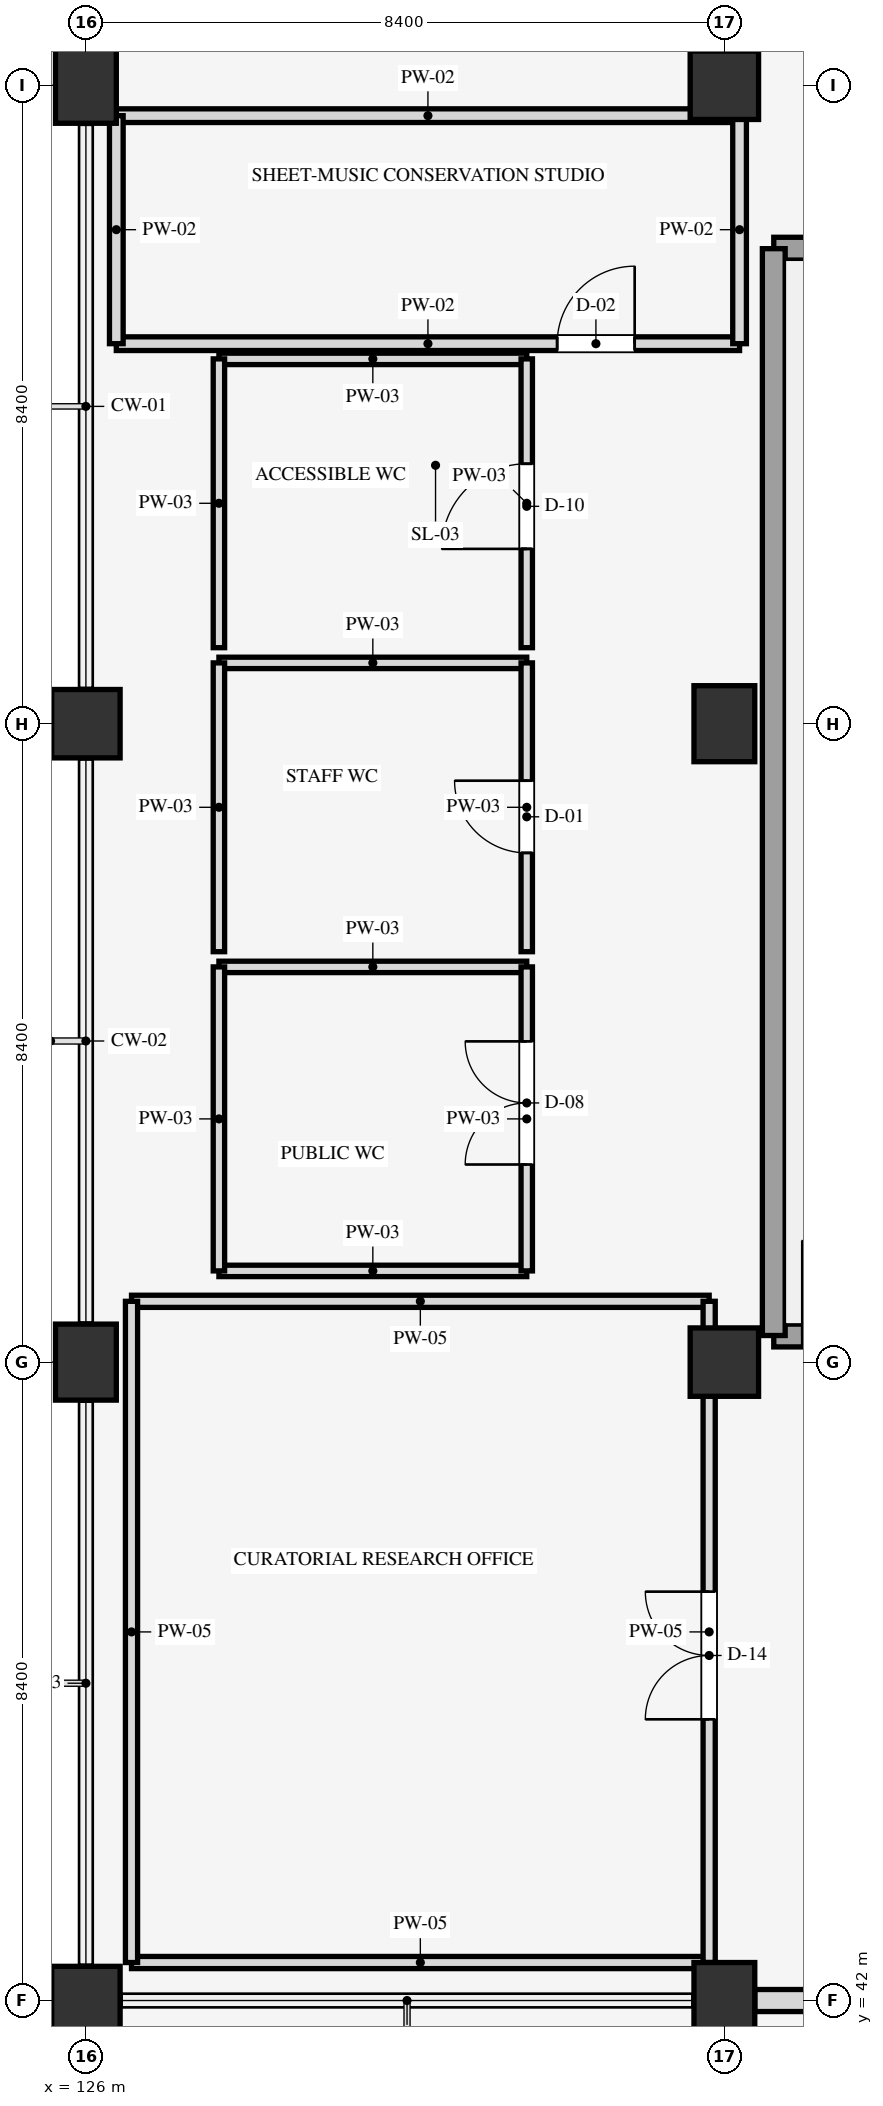
"""IFC4 building model, lengths in metres.
Left out: names, types, materials, properties, quantities, classifications, styles, units other than length and angle.
Written with IfcOpenShell. Run it as: python <this file> out.ifc"""

import sys

from ifc_helpers import new_model, si_unit, direction, frame, frame_2d, origin, origin_2d, place, context, subcontext, project, spatial, rectangle, extrude, element, fill, save


model = new_model("IFC4")
c1 = context("Model", 3, precision=1e-05, world=origin(), true_north=direction((0.0, 1.0)))
c2 = subcontext(c1, "Body", "Model", "MODEL_VIEW")
j1 = project(units=[si_unit("LENGTHUNIT", "METRE"), si_unit("PLANEANGLEUNIT", "RADIAN")], contexts=[c1])
p1 = place(None, origin())
s1 = spatial("IfcSite", under=j1, at=p1, CompositionType="ELEMENT")
p2 = place(p1, origin())
s2 = spatial("IfcBuilding", under=s1, at=p2, CompositionType="ELEMENT")
p3 = place(p2, frame((0.0, 0.0, 57.3)))
s3 = spatial("IfcBuildingStorey", under=s2, at=p3, CompositionType="ELEMENT", Elevation=57.3)
p4 = place(p3, frame((126.0, 42.0, 0.0), z_axis=(0.0, 0.0, 1.0), x_axis=(1.0, 0.0, 0.0)))
e1 = element("IfcColumn", 1, at=p4, inside=s3, PredefinedType="COLUMN", context=c2, shape_type="SweptSolid", body=[
    extrude(rectangle(XDim=0.9, YDim=0.9, at=origin_2d()), origin(), (0.0, 0.0, 1.0), 4.2),
])
p5 = place(p3, frame((126.0, 50.4, 0.0), z_axis=(0.0, 0.0, 1.0), x_axis=(1.0, 0.0, 0.0)))
e2 = element("IfcColumn", 2, at=p5, inside=s3, PredefinedType="COLUMN", context=c2, shape_type="SweptSolid", body=[
    extrude(rectangle(XDim=0.8, YDim=1.0, at=origin_2d()), origin(), (0.0, 0.0, 1.0), 4.2),
])
p6 = place(p3, frame((126.0, 58.8, 0.0), z_axis=(0.0, 0.0, 1.0), x_axis=(1.0, 0.0, 0.0)))
e3 = element("IfcColumn", 3, at=p6, inside=s3, PredefinedType="COLUMN", context=c2, shape_type="SweptSolid", body=[
    extrude(rectangle(XDim=0.9, YDim=0.9, at=origin_2d()), origin(), (0.0, 0.0, 1.0), 4.2),
])
for number, where, z_axis, x_axis in (
    (4, (126.0, 67.2, 0.0), (0.0, 0.0, 1.0), (1.0, 0.0, 0.0)),
    (5, (134.4, 42.0, 0.0), (0.0, 0.0, 1.0), (1.0, 0.0, 0.0)),
):
    element("IfcColumn", number, at=place(p3, frame(where, z_axis=z_axis, x_axis=x_axis)), inside=s3, PredefinedType="COLUMN", context=c2, shape_type="SweptSolid", body=[
        extrude(rectangle(XDim=0.8, YDim=1.0, at=origin_2d()), origin(), (0.0, 0.0, 1.0), 4.2),
    ])
p7 = place(p3, frame((134.4, 50.4, 0.0), z_axis=(0.0, 0.0, 1.0), x_axis=(1.0, 0.0, 0.0)))
e6 = element("IfcColumn", 6, at=p7, inside=s3, PredefinedType="COLUMN", context=c2, shape_type="SweptSolid", body=[
    extrude(rectangle(XDim=0.9, YDim=0.9, at=origin_2d()), origin(), (0.0, 0.0, 1.0), 4.2),
])
p8 = place(p3, frame((134.4, 58.8, 0.0), z_axis=(0.0, 0.0, 1.0), x_axis=(1.0, 0.0, 0.0)))
e7 = element("IfcColumn", 7, at=p8, inside=s3, PredefinedType="COLUMN", context=c2, shape_type="SweptSolid", body=[
    extrude(rectangle(XDim=0.8, YDim=1.0, at=origin_2d()), origin(), (0.0, 0.0, 1.0), 4.2),
])
p9 = place(p3, frame((134.4, 67.2, 0.0), z_axis=(0.0, 0.0, 1.0), x_axis=(1.0, 0.0, 0.0)))
e8 = element("IfcColumn", 8, at=p9, inside=s3, PredefinedType="COLUMN", context=c2, shape_type="SweptSolid", body=[
    extrude(rectangle(XDim=0.9, YDim=0.9, at=origin_2d()), origin(), (0.0, 0.0, 1.0), 4.2),
])
p10 = place(p3, frame((134.8, 42.0, 0.0), z_axis=(0.0, 0.0, 1.0), x_axis=(1.0, 0.0, 0.0)))
e9 = element("IfcWall", 9, at=p10, inside=s3, PredefinedType="STANDARD", context=c2, shape_type="SweptSolid", body=[
    extrude(rectangle(XDim=7.55, YDim=0.29, at=frame_2d((3.775, 0.0))), origin(), (0.0, 0.0, 1.0), 3.38),
])
p11 = place(p10, frame((2.95, 0.0, 0.0)))
e10 = element("IfcOpeningElement", 10, at=p11, cuts=e9, PredefinedType="OPENING", context=c2, shape_type="SweptSolid", body=[
    extrude(rectangle(XDim=1.65, YDim=2.2, at=frame_2d((0.825, 1.1))), frame((0.0, 0.155, 0.0), z_axis=(0.0, -1.0, 0.0), x_axis=(1.0, 0.0, 0.0)), (0.0, 0.0, 1.0), 0.31),
])
p12 = place(p3, frame((135.05, 50.75, 0.0), z_axis=(0.0, 0.0, 1.0), x_axis=(1.0, 0.0, 0.0)))
e11 = element("IfcWall", 11, at=p12, inside=s3, PredefinedType="SHEAR", context=c2, shape_type="SweptSolid", body=[
    extrude(rectangle(XDim=4.0, YDim=0.3, at=frame_2d((2.0, 0.0))), origin(), (0.0, 0.0, 1.0), 4.2),
])
p13 = place(p12, frame((0.375, 0.0, 0.0)))
e12 = element("IfcOpeningElement", 12, at=p13, cuts=e11, PredefinedType="OPENING", context=c2, shape_type="SweptSolid", body=[
    extrude(rectangle(XDim=1.25, YDim=2.15, at=frame_2d((0.625, 1.075))), frame((0.0, 0.16, 0.0), z_axis=(0.0, -1.0, 0.0), x_axis=(1.0, 0.0, 0.0)), (0.0, 0.0, 1.0), 0.32),
])
p14 = place(p3, frame((135.05, 65.05, 0.0), z_axis=(0.0, 0.0, 1.0), x_axis=(1.0, 0.0, 0.0)))
e13 = element("IfcWall", 13, at=p14, inside=s3, PredefinedType="SHEAR", context=c2, shape_type="SweptSolid", body=[
    extrude(rectangle(XDim=4.0, YDim=0.3, at=frame_2d((2.0, 0.0))), origin(), (0.0, 0.0, 1.0), 4.2),
])
p15 = place(p3, frame((135.05, 50.75, 0.0), z_axis=(0.0, 0.0, 1.0), x_axis=(0.0, 1.0, 0.0)))
e14 = element("IfcWall", 14, at=p15, inside=s3, PredefinedType="SHEAR", context=c2, shape_type="SweptSolid", body=[
    extrude(rectangle(XDim=14.3, YDim=0.3, at=frame_2d((7.15, 0.0))), origin(), (0.0, 0.0, 1.0), 4.2),
])
for number, where, z_axis, x_axis in (
    (15, (127.75, 51.6, 0.0), (0.0, 0.0, 1.0), (1.0, 0.0, 0.0)),
    (16, (127.75, 55.6, 0.0), (0.0, 0.0, 1.0), (1.0, 0.0, 0.0)),
):
    element("IfcWall", number, at=place(p3, frame(where, z_axis=z_axis, x_axis=x_axis)), inside=s3, PredefinedType="PARTITIONING", context=c2, shape_type="SweptSolid", body=[
        extrude(rectangle(XDim=4.05, YDim=0.15, at=frame_2d((2.025, 0.0))), origin(), (0.0, 0.0, 1.0), 3.24),
    ])
p16 = place(p3, frame((127.75, 51.6, 0.0), z_axis=(0.0, 0.0, 1.0), x_axis=(0.0, 1.0, 0.0)))
e17 = element("IfcWall", 17, at=p16, inside=s3, PredefinedType="PARTITIONING", context=c2, shape_type="SweptSolid", body=[
    extrude(rectangle(XDim=4.0, YDim=0.15, at=frame_2d((2.0, 0.0))), origin(), (0.0, 0.0, 1.0), 3.24),
])
p17 = place(p3, frame((131.8, 51.6, 0.0), z_axis=(0.0, 0.0, 1.0), x_axis=(0.0, 1.0, 0.0)))
e18 = element("IfcWall", 18, at=p17, inside=s3, PredefinedType="PARTITIONING", context=c2, shape_type="SweptSolid", body=[
    extrude(rectangle(XDim=4.0, YDim=0.15, at=frame_2d((2.0, 0.0))), origin(), (0.0, 0.0, 1.0), 3.24),
])
p18 = place(p17, frame((1.4, 0.0, 0.0)))
e19 = element("IfcOpeningElement", 19, at=p18, cuts=e18, PredefinedType="OPENING", context=c2, shape_type="SweptSolid", body=[
    extrude(rectangle(XDim=1.62, YDim=2.22, at=frame_2d((0.81, 1.11))), frame((0.0, 0.085, 0.0), z_axis=(0.0, -1.0, 0.0), x_axis=(1.0, 0.0, 0.0)), (0.0, 0.0, 1.0), 0.17),
])
p19 = place(p3, frame((127.75, 59.6, 0.0), z_axis=(0.0, 0.0, 1.0), x_axis=(1.0, 0.0, 0.0)))
e20 = element("IfcWall", 20, at=p19, inside=s3, PredefinedType="PARTITIONING", context=c2, shape_type="SweptSolid", body=[
    extrude(rectangle(XDim=4.05, YDim=0.15, at=frame_2d((2.025, 0.0))), origin(), (0.0, 0.0, 1.0), 3.24),
])
p20 = place(p3, frame((127.75, 55.8, 0.0), z_axis=(0.0, 0.0, 1.0), x_axis=(0.0, 1.0, 0.0)))
e21 = element("IfcWall", 21, at=p20, inside=s3, PredefinedType="PARTITIONING", context=c2, shape_type="SweptSolid", body=[
    extrude(rectangle(XDim=3.8, YDim=0.15, at=frame_2d((1.9, 0.0))), origin(), (0.0, 0.0, 1.0), 3.24),
])
p21 = place(p3, frame((131.8, 55.8, 0.0), z_axis=(0.0, 0.0, 1.0), x_axis=(0.0, 1.0, 0.0)))
e22 = element("IfcWall", 22, at=p21, inside=s3, PredefinedType="PARTITIONING", context=c2, shape_type="SweptSolid", body=[
    extrude(rectangle(XDim=3.8, YDim=0.15, at=frame_2d((1.9, 0.0))), origin(), (0.0, 0.0, 1.0), 3.24),
])
p22 = place(p21, frame((1.3, 0.0, 0.0)))
e23 = element("IfcOpeningElement", 23, at=p22, cuts=e22, PredefinedType="OPENING", context=c2, shape_type="SweptSolid", body=[
    extrude(rectangle(XDim=0.95, YDim=2.1, at=frame_2d((0.475, 1.05))), frame((0.0, 0.085, 0.0), z_axis=(0.0, -1.0, 0.0), x_axis=(1.0, 0.0, 0.0)), (0.0, 0.0, 1.0), 0.17),
])
p23 = place(p3, frame((127.75, 63.6, 0.0), z_axis=(0.0, 0.0, 1.0), x_axis=(1.0, 0.0, 0.0)))
e24 = element("IfcWall", 24, at=p23, inside=s3, PredefinedType="PARTITIONING", context=c2, shape_type="SweptSolid", body=[
    extrude(rectangle(XDim=4.05, YDim=0.15, at=frame_2d((2.025, 0.0))), origin(), (0.0, 0.0, 1.0), 3.24),
])
p24 = place(p3, frame((127.75, 59.8, 0.0), z_axis=(0.0, 0.0, 1.0), x_axis=(0.0, 1.0, 0.0)))
e25 = element("IfcWall", 25, at=p24, inside=s3, PredefinedType="PARTITIONING", context=c2, shape_type="SweptSolid", body=[
    extrude(rectangle(XDim=3.8, YDim=0.15, at=frame_2d((1.9, 0.0))), origin(), (0.0, 0.0, 1.0), 3.24),
])
p25 = place(p3, frame((131.8, 59.8, 0.0), z_axis=(0.0, 0.0, 1.0), x_axis=(0.0, 1.0, 0.0)))
e26 = element("IfcWall", 26, at=p25, inside=s3, PredefinedType="PARTITIONING", context=c2, shape_type="SweptSolid", body=[
    extrude(rectangle(XDim=3.8, YDim=0.15, at=frame_2d((1.9, 0.0))), origin(), (0.0, 0.0, 1.0), 3.24),
])
p26 = place(p25, frame((1.3, 0.0, 0.0)))
e27 = element("IfcOpeningElement", 27, at=p26, cuts=e26, PredefinedType="OPENING", context=c2, shape_type="SweptSolid", body=[
    extrude(rectangle(XDim=1.12, YDim=2.14, at=frame_2d((0.56, 1.07))), frame((0.0, 0.085, 0.0), z_axis=(0.0, -1.0, 0.0), x_axis=(1.0, 0.0, 0.0)), (0.0, 0.0, 1.0), 0.17),
])
for number, where, z_axis, x_axis in (
    (28, (126.6, 42.5, 0.0), (0.0, 0.0, 1.0), (1.0, 0.0, 0.0)),
    (29, (126.6, 51.2, 0.0), (0.0, 0.0, 1.0), (1.0, 0.0, 0.0)),
):
    element("IfcWall", number, at=place(p3, frame(where, z_axis=z_axis, x_axis=x_axis)), inside=s3, PredefinedType="PARTITIONING", context=c2, shape_type="SweptSolid", body=[
        extrude(rectangle(XDim=7.6, YDim=0.16, at=frame_2d((3.8, 0.0))), origin(), (0.0, 0.0, 1.0), 3.24),
    ])
p27 = place(p3, frame((126.6, 42.5, 0.0), z_axis=(0.0, 0.0, 1.0), x_axis=(0.0, 1.0, 0.0)))
e30 = element("IfcWall", 30, at=p27, inside=s3, PredefinedType="PARTITIONING", context=c2, shape_type="SweptSolid", body=[
    extrude(rectangle(XDim=8.7, YDim=0.16, at=frame_2d((4.35, 0.0))), origin(), (0.0, 0.0, 1.0), 3.24),
])
p28 = place(p3, frame((134.2, 42.5, 0.0), z_axis=(0.0, 0.0, 1.0), x_axis=(0.0, 1.0, 0.0)))
e31 = element("IfcWall", 31, at=p28, inside=s3, PredefinedType="PARTITIONING", context=c2, shape_type="SweptSolid", body=[
    extrude(rectangle(XDim=8.7, YDim=0.16, at=frame_2d((4.35, 0.0))), origin(), (0.0, 0.0, 1.0), 3.24),
])
p29 = place(p28, frame((3.2, 0.0, 0.0)))
e32 = element("IfcOpeningElement", 32, at=p29, cuts=e31, PredefinedType="OPENING", context=c2, shape_type="SweptSolid", body=[
    extrude(rectangle(XDim=1.68, YDim=2.24, at=frame_2d((0.84, 1.12))), frame((0.0, 0.09, 0.0), z_axis=(0.0, -1.0, 0.0), x_axis=(1.0, 0.0, 0.0)), (0.0, 0.0, 1.0), 0.18),
])
p30 = place(p3, frame((126.4, 63.8, 0.0), z_axis=(0.0, 0.0, 1.0), x_axis=(1.0, 0.0, 0.0)))
e33 = element("IfcWall", 33, at=p30, inside=s3, PredefinedType="PARTITIONING", context=c2, shape_type="SweptSolid", body=[
    extrude(rectangle(XDim=8.2, YDim=0.18, at=frame_2d((4.1, 0.0))), origin(), (0.0, 0.0, 1.0), 3.24),
])
p31 = place(p30, frame((5.8, 0.0, 0.0)))
e34 = element("IfcOpeningElement", 34, at=p31, cuts=e33, PredefinedType="OPENING", context=c2, shape_type="SweptSolid", body=[
    extrude(rectangle(XDim=1.02, YDim=2.1, at=frame_2d((0.51, 1.05))), frame((0.0, 0.1, 0.0), z_axis=(0.0, -1.0, 0.0), x_axis=(1.0, 0.0, 0.0)), (0.0, 0.0, 1.0), 0.2),
])
p32 = place(p3, frame((126.4, 66.8, 0.0), z_axis=(0.0, 0.0, 1.0), x_axis=(1.0, 0.0, 0.0)))
e35 = element("IfcWall", 35, at=p32, inside=s3, PredefinedType="PARTITIONING", context=c2, shape_type="SweptSolid", body=[
    extrude(rectangle(XDim=8.2, YDim=0.18, at=frame_2d((4.1, 0.0))), origin(), (0.0, 0.0, 1.0), 3.24),
])
for number, where, z_axis, x_axis in (
    (36, (126.4, 63.8, 0.0), (0.0, 0.0, 1.0), (0.0, 1.0, 0.0)),
    (37, (134.6, 63.8, 0.0), (0.0, 0.0, 1.0), (0.0, 1.0, 0.0)),
):
    element("IfcWall", number, at=place(p3, frame(where, z_axis=z_axis, x_axis=x_axis)), inside=s3, PredefinedType="PARTITIONING", context=c2, shape_type="SweptSolid", body=[
        extrude(rectangle(XDim=3.0, YDim=0.18, at=frame_2d((1.5, 0.0))), origin(), (0.0, 0.0, 1.0), 3.24),
    ])
p33 = place(p13, origin())
e38 = element("IfcDoor", 38, at=p33, inside=s3, OperationType="SINGLE_SWING_LEFT", PredefinedType="DOOR", context=c2, shape_type="SweptSolid", body=[
    extrude(rectangle(XDim=1.25, YDim=2.15, at=frame_2d((0.625, 1.075))), frame((0.0, 0.025, 0.0), z_axis=(0.0, -1.0, 0.0), x_axis=(1.0, 0.0, 0.0)), (0.0, 0.0, 1.0), 0.05),
])
fill(e12, e38)
p34 = place(p18, origin())
e39 = element("IfcDoor", 39, at=p34, inside=s3, OperationType="DOUBLE_DOOR_SINGLE_SWING", PredefinedType="DOOR", context=c2, shape_type="SweptSolid", body=[
    extrude(rectangle(XDim=1.62, YDim=2.22, at=frame_2d((0.81, 1.11))), frame((0.0, 0.025, 0.0), z_axis=(0.0, -1.0, 0.0), x_axis=(1.0, 0.0, 0.0)), (0.0, 0.0, 1.0), 0.05),
])
fill(e19, e39)
p35 = place(p22, origin())
e40 = element("IfcDoor", 40, at=p35, inside=s3, OperationType="SINGLE_SWING_RIGHT", PredefinedType="DOOR", context=c2, shape_type="SweptSolid", body=[
    extrude(rectangle(XDim=0.95, YDim=2.1, at=frame_2d((0.475, 1.05))), frame((0.0, 0.025, 0.0), z_axis=(0.0, -1.0, 0.0), x_axis=(1.0, 0.0, 0.0)), (0.0, 0.0, 1.0), 0.05),
])
fill(e23, e40)
p36 = place(p26, origin())
e41 = element("IfcDoor", 41, at=p36, inside=s3, OperationType="SINGLE_SWING_LEFT", PredefinedType="DOOR", context=c2, shape_type="SweptSolid", body=[
    extrude(rectangle(XDim=1.12, YDim=2.14, at=frame_2d((0.56, 1.07))), frame((0.0, 0.025, 0.0), z_axis=(0.0, -1.0, 0.0), x_axis=(1.0, 0.0, 0.0)), (0.0, 0.0, 1.0), 0.05),
])
fill(e27, e41)
p37 = place(p29, origin())
e42 = element("IfcDoor", 42, at=p37, inside=s3, OperationType="DOUBLE_DOOR_SINGLE_SWING", PredefinedType="DOOR", context=c2, shape_type="SweptSolid", body=[
    extrude(rectangle(XDim=1.68, YDim=2.24, at=frame_2d((0.84, 1.12))), frame((0.0, 0.025, 0.0), z_axis=(0.0, -1.0, 0.0), x_axis=(1.0, 0.0, 0.0)), (0.0, 0.0, 1.0), 0.05),
])
fill(e32, e42)
p38 = place(p31, origin())
e43 = element("IfcDoor", 43, at=p38, inside=s3, OperationType="SINGLE_SWING_RIGHT", PredefinedType="DOOR", context=c2, shape_type="SweptSolid", body=[
    extrude(rectangle(XDim=1.02, YDim=2.1, at=frame_2d((0.51, 1.05))), frame((0.0, 0.025, 0.0), z_axis=(0.0, -1.0, 0.0), x_axis=(1.0, 0.0, 0.0)), (0.0, 0.0, 1.0), 0.05),
])
fill(e34, e43)
save(model, sys.argv[1])
